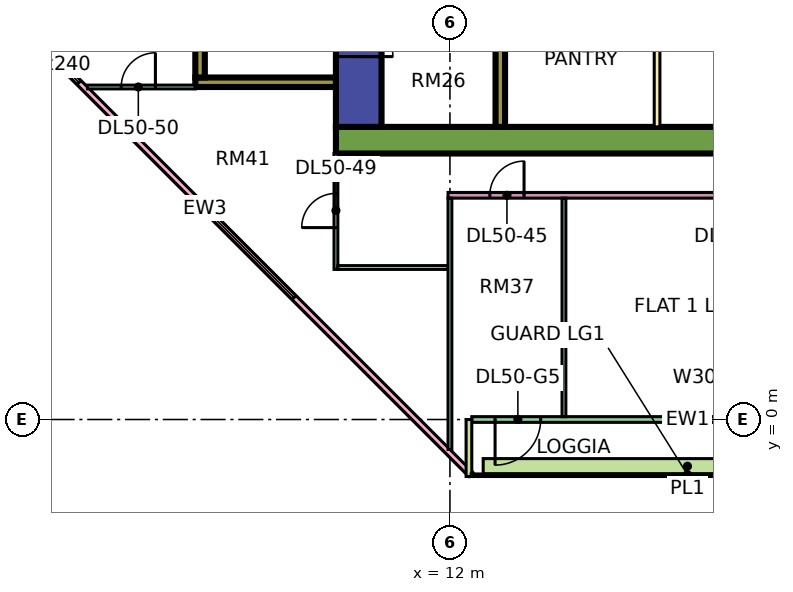
"""IFC4 building model, lengths in metres.
Left out: names, types, materials, properties, quantities, classifications, styles, units other than length and angle.
Written with IfcOpenShell. Run it as: python <this file> out.ifc"""

import sys

from ifc_helpers import new_model, si_unit, direction, frame, frame_2d, origin, place, context, subcontext, project, spatial, rectangle, extrude, element, fill, save


model = new_model("IFC4")
c1 = context("Model", 3, precision=1e-05, world=origin(), true_north=direction((0.0, 1.0)))
c2 = subcontext(c1, "Body", "Model", "MODEL_VIEW")
j1 = project(units=[si_unit("LENGTHUNIT", "METRE"), si_unit("PLANEANGLEUNIT", "RADIAN")], contexts=[c1])
p1 = place(None, origin())
s1 = spatial("IfcSite", under=j1, at=p1, CompositionType="ELEMENT")
p2 = place(p1, origin())
s2 = spatial("IfcBuilding", under=s1, at=p2, CompositionType="ELEMENT")
p3 = place(p2, frame((0.0, 0.0, 215.4)))
s3 = spatial("IfcBuildingStorey", under=s2, at=p3, CompositionType="ELEMENT", Elevation=215.4)
p4 = place(p3, frame((9.0, 7.35, 0.0), z_axis=(0.0, 0.0, 1.0), x_axis=(1.0, 0.0, 0.0)))
e1 = element("IfcWall", 1, at=p4, inside=s3, PredefinedType="SHEAR", context=c2, shape_type="SweptSolid", body=[
    extrude(rectangle(XDim=25.0, YDim=0.7, at=frame_2d((12.5, 0.0))), origin(), (0.0, 0.0, 1.0), 3.75),
])
p5 = place(p3, frame((9.6, 7.7, 0.0), z_axis=(0.0, 0.0, 1.0), x_axis=(0.0, 1.0, 0.0)))
e2 = element("IfcWall", 2, at=p5, inside=s3, PredefinedType="SHEAR", context=c2, shape_type="SweptSolid", body=[
    extrude(rectangle(XDim=11.6, YDim=1.2, at=frame_2d((5.8, 0.0))), origin(), (0.0, 0.0, 1.0), 3.75),
])
p6 = place(p5, frame((4.175, 0.0, 0.0)))
e3 = element("IfcOpeningElement", 3, at=p6, cuts=e2, PredefinedType="OPENING", context=c2, shape_type="SweptSolid", body=[
    extrude(rectangle(XDim=1.1, YDim=2.2, at=frame_2d((0.55, 1.1))), frame((0.0, 0.61, 0.0), z_axis=(0.0, -1.0, 0.0), x_axis=(1.0, 0.0, 0.0)), (0.0, 0.0, 1.0), 1.22),
])
p7 = place(p5, frame((6.675, 0.0, 0.0)))
e4 = element("IfcOpeningElement", 4, at=p7, cuts=e2, PredefinedType="OPENING", context=c2, shape_type="SweptSolid", body=[
    extrude(rectangle(XDim=1.1, YDim=2.2, at=frame_2d((0.55, 1.1))), frame((0.0, 0.61, 0.0), z_axis=(0.0, -1.0, 0.0), x_axis=(1.0, 0.0, 0.0)), (0.0, 0.0, 1.0), 1.22),
])
p8 = place(p5, frame((9.55, 0.0, 0.0)))
e5 = element("IfcOpeningElement", 5, at=p8, cuts=e2, PredefinedType="OPENING", context=c2, shape_type="SweptSolid", body=[
    extrude(rectangle(XDim=1.1, YDim=2.2, at=frame_2d((0.55, 1.1))), frame((0.0, 0.61, 0.0), z_axis=(0.0, -1.0, 0.0), x_axis=(1.0, 0.0, 0.0)), (0.0, 0.0, 1.0), 1.22),
])
p9 = place(p5, frame((1.85, 0.0, 0.0)))
e6 = element("IfcOpeningElement", 6, at=p9, cuts=e2, PredefinedType="OPENING", context=c2, shape_type="SweptSolid", body=[
    extrude(rectangle(XDim=0.9, YDim=2.1, at=frame_2d((0.45, 1.05))), frame((0.0, 0.61, 0.0), z_axis=(0.0, -1.0, 0.0), x_axis=(1.0, 0.0, 0.0)), (0.0, 0.0, 1.0), 1.22),
])
p10 = place(p3, frame((13.325, 7.7, 0.0), z_axis=(0.0, 0.0, 1.0), x_axis=(0.0, 1.0, 0.0)))
e7 = element("IfcWall", 7, at=p10, inside=s3, PredefinedType="SHEAR", context=c2, shape_type="SweptSolid", body=[
    extrude(rectangle(XDim=11.6, YDim=0.25, at=frame_2d((5.8, 0.0))), origin(), (0.0, 0.0, 1.0), 3.75),
])
p11 = place(p3, frame((5.3, 8.875, 0.0), z_axis=(0.0, 0.0, 1.0), x_axis=(1.0, 0.0, 0.0)))
e8 = element("IfcWall", 8, at=p11, inside=s3, PredefinedType="SHEAR", context=c2, shape_type="SweptSolid", body=[
    extrude(rectangle(XDim=3.7, YDim=0.25, at=frame_2d((1.85, 0.0))), origin(), (0.0, 0.0, 1.0), 3.75),
])
p12 = place(p3, frame((5.425, 9.0, 0.0), z_axis=(0.0, 0.0, 1.0), x_axis=(0.0, 1.0, 0.0)))
e9 = element("IfcWall", 9, at=p12, inside=s3, PredefinedType="SHEAR", context=c2, shape_type="SweptSolid", body=[
    extrude(rectangle(XDim=4.0, YDim=0.25, at=frame_2d((2.0, 0.0))), origin(), (0.0, 0.0, 1.0), 3.75),
])
p13 = place(p3, frame((-1.447, 12.553, 0.0), z_axis=(0.0, 0.0, 1.0), x_axis=(0.707106781187, -0.707106781187, 0.0)))
e10 = element("IfcWall", 10, at=p13, inside=s3, PredefinedType="SOLIDWALL", context=c2, shape_type="SweptSolid", body=[
    extrude(rectangle(XDim=19.799, YDim=0.15, at=frame_2d((9.899, 0.0))), origin(), (0.0, 0.0, 1.0), 3.35),
])
p14 = place(p13, frame((2.212, 0.0, 0.45)))
e11 = element("IfcOpeningElement", 11, at=p14, cuts=e10, PredefinedType="OPENING", context=c2, shape_type="SweptSolid", body=[
    extrude(rectangle(XDim=3.0, YDim=2.4, at=frame_2d((1.5, 1.2))), frame((0.0, 0.085, 0.0), z_axis=(0.0, -1.0, 0.0), x_axis=(1.0, 0.0, 0.0)), (0.0, 0.0, 1.0), 0.17),
])
p15 = place(p13, frame((10.216, 0.0, 0.45)))
e12 = element("IfcOpeningElement", 12, at=p15, cuts=e10, PredefinedType="OPENING", context=c2, shape_type="SweptSolid", body=[
    extrude(rectangle(XDim=3.0, YDim=2.4, at=frame_2d((1.5, 1.2))), frame((0.0, 0.085, 0.0), z_axis=(0.0, -1.0, 0.0), x_axis=(1.0, 0.0, 0.0)), (0.0, 0.0, 1.0), 0.17),
])
p16 = place(p3, frame((12.575, 0.0, 0.0), z_axis=(0.0, 0.0, 1.0), x_axis=(1.0, 0.0, 0.0)))
e13 = element("IfcWall", 13, at=p16, inside=s3, PredefinedType="SOLIDWALL", context=c2, shape_type="SweptSolid", body=[
    extrude(rectangle(XDim=11.35, YDim=0.15, at=frame_2d((5.675, 0.0))), origin(), (0.0, 0.0, 1.0), 3.35),
])
p17 = place(p16, frame((0.613, 0.0, 0.0)))
e14 = element("IfcOpeningElement", 14, at=p17, cuts=e13, PredefinedType="OPENING", context=c2, shape_type="SweptSolid", body=[
    extrude(rectangle(XDim=1.2, YDim=2.4, at=frame_2d((0.6, 1.2))), frame((0.0, 0.085, 0.0), z_axis=(0.0, -1.0, 0.0), x_axis=(1.0, 0.0, 0.0)), (0.0, 0.0, 1.0), 0.17),
])
p18 = place(p16, frame((5.163, 0.0, 0.45)))
e15 = element("IfcOpeningElement", 15, at=p18, cuts=e13, PredefinedType="OPENING", context=c2, shape_type="SweptSolid", body=[
    extrude(rectangle(XDim=3.0, YDim=2.4, at=frame_2d((1.5, 1.2))), frame((0.0, 0.085, 0.0), z_axis=(0.0, -1.0, 0.0), x_axis=(1.0, 0.0, 0.0)), (0.0, 0.0, 1.0), 0.17),
])
p19 = place(p3, frame((12.5, -1.5, 0.0), z_axis=(0.0, 0.0, 1.0), x_axis=(0.0, 1.0, 0.0)))
e16 = element("IfcWall", 16, at=p19, inside=s3, PredefinedType="SOLIDWALL", context=c2, shape_type="SweptSolid", body=[
    extrude(rectangle(XDim=1.5, YDim=0.15, at=frame_2d((0.75, 0.0))), origin(), (0.0, 0.0, 1.0), 3.35),
])
p20 = place(p3, frame((12.875, -1.229, 0.0), z_axis=(0.0, 0.0, 1.0), x_axis=(1.0, 0.0, 0.0)))
e17 = element("IfcWall", 17, at=p20, inside=s3, PredefinedType="SOLIDWALL", context=c2, shape_type="SweptSolid", body=[
    extrude(rectangle(XDim=10.75, YDim=0.4, at=frame_2d((5.375, 0.0))), origin(), (0.0, 0.0, 1.0), 0.7),
])
p21 = place(p3, frame((17.45, 7.7, 0.0), z_axis=(0.0, 0.0, 1.0), x_axis=(0.0, 1.0, 0.0)))
e18 = element("IfcWall", 18, at=p21, inside=s3, PredefinedType="PARTITIONING", context=c2, shape_type="SweptSolid", body=[
    extrude(rectangle(XDim=3.5, YDim=0.15, at=frame_2d((1.75, 0.0))), origin(), (0.0, 0.0, 1.0), 3.35),
])
p22 = place(p3, frame((2.461, 8.75, 0.0), z_axis=(0.0, 0.0, 1.0), x_axis=(1.0, 0.0, 0.0)))
e19 = element("IfcWall", 19, at=p22, inside=s3, PredefinedType="PARTITIONING", context=c2, shape_type="SweptSolid", body=[
    extrude(rectangle(XDim=2.839, YDim=0.1, at=frame_2d((1.419, 0.0))), origin(), (0.0, 0.0, 1.0), 3.35),
])
p23 = place(p22, frame((0.889, 0.0, 0.0)))
e20 = element("IfcOpeningElement", 20, at=p23, cuts=e19, PredefinedType="OPENING", context=c2, shape_type="SweptSolid", body=[
    extrude(rectangle(XDim=0.9, YDim=2.1, at=frame_2d((0.45, 1.05))), frame((0.0, 0.06, 0.0), z_axis=(0.0, -1.0, 0.0), x_axis=(1.0, 0.0, 0.0)), (0.0, 0.0, 1.0), 0.12),
])
p24 = place(p3, frame((9.0, 3.95, 0.0), z_axis=(0.0, 0.0, 1.0), x_axis=(0.0, 1.0, 0.0)))
e21 = element("IfcWall", 21, at=p24, inside=s3, PredefinedType="PARTITIONING", context=c2, shape_type="SweptSolid", body=[
    extrude(rectangle(XDim=3.05, YDim=0.1, at=frame_2d((1.525, 0.0))), origin(), (0.0, 0.0, 1.0), 3.35),
])
p25 = place(p24, frame((1.1, 0.0, 0.0)))
e22 = element("IfcOpeningElement", 22, at=p25, cuts=e21, PredefinedType="OPENING", context=c2, shape_type="SweptSolid", body=[
    extrude(rectangle(XDim=0.9, YDim=2.1, at=frame_2d((0.45, 1.05))), frame((0.0, 0.06, 0.0), z_axis=(0.0, -1.0, 0.0), x_axis=(1.0, 0.0, 0.0)), (0.0, 0.0, 1.0), 0.12),
])
p26 = place(p3, frame((9.05, 4.0, 0.0), z_axis=(0.0, 0.0, 1.0), x_axis=(1.0, 0.0, 0.0)))
e23 = element("IfcWall", 23, at=p26, inside=s3, PredefinedType="PARTITIONING", context=c2, shape_type="SweptSolid", body=[
    extrude(rectangle(XDim=2.9, YDim=0.1, at=frame_2d((1.45, 0.0))), origin(), (0.0, 0.0, 1.0), 3.35),
])
p27 = place(p3, frame((11.95, 5.9, 0.0), z_axis=(0.0, 0.0, 1.0), x_axis=(1.0, 0.0, 0.0)))
e24 = element("IfcWall", 24, at=p27, inside=s3, PredefinedType="PARTITIONING", context=c2, shape_type="SweptSolid", body=[
    extrude(rectangle(XDim=21.1, YDim=0.15, at=frame_2d((10.55, 0.0))), origin(), (0.0, 0.0, 1.0), 3.35),
])
p28 = place(p27, frame((1.1, 0.0, 0.0)))
e25 = element("IfcOpeningElement", 25, at=p28, cuts=e24, PredefinedType="OPENING", context=c2, shape_type="SweptSolid", body=[
    extrude(rectangle(XDim=0.9, YDim=2.1, at=frame_2d((0.45, 1.05))), frame((0.0, 0.085, 0.0), z_axis=(0.0, -1.0, 0.0), x_axis=(1.0, 0.0, 0.0)), (0.0, 0.0, 1.0), 0.17),
])
p29 = place(p27, frame((13.1, 0.0, 0.0)))
e26 = element("IfcOpeningElement", 26, at=p29, cuts=e24, PredefinedType="OPENING", context=c2, shape_type="SweptSolid", body=[
    extrude(rectangle(XDim=0.9, YDim=2.1, at=frame_2d((0.45, 1.05))), frame((0.0, 0.085, 0.0), z_axis=(0.0, -1.0, 0.0), x_axis=(1.0, 0.0, 0.0)), (0.0, 0.0, 1.0), 0.17),
])
p30 = place(p27, frame((7.1, 0.0, 0.0)))
e27 = element("IfcOpeningElement", 27, at=p30, cuts=e24, PredefinedType="OPENING", context=c2, shape_type="SweptSolid", body=[
    extrude(rectangle(XDim=0.9, YDim=2.1, at=frame_2d((0.45, 1.05))), frame((0.0, 0.085, 0.0), z_axis=(0.0, -1.0, 0.0), x_axis=(1.0, 0.0, 0.0)), (0.0, 0.0, 1.0), 0.17),
])
p31 = place(p3, frame((12.0, -0.788, 0.0), z_axis=(0.0, 0.0, 1.0), x_axis=(0.0, 1.0, 0.0)))
e28 = element("IfcWall", 28, at=p31, inside=s3, PredefinedType="PARTITIONING", context=c2, shape_type="SweptSolid", body=[
    extrude(rectangle(XDim=6.613, YDim=0.1, at=frame_2d((3.306, 0.0))), origin(), (0.0, 0.0, 1.0), 3.35),
])
p32 = place(p3, frame((15.0, 0.074, 0.0), z_axis=(0.0, 0.0, 1.0), x_axis=(0.0, 1.0, 0.0)))
e29 = element("IfcWall", 29, at=p32, inside=s3, PredefinedType="PARTITIONING", context=c2, shape_type="SweptSolid", body=[
    extrude(rectangle(XDim=5.751, YDim=0.1, at=frame_2d((2.875, 0.0))), origin(), (0.0, 0.0, 1.0), 3.35),
])
p33 = place(p14, origin())
e30 = element("IfcWindow", 30, at=p33, inside=s3, PartitioningType="SINGLE_PANEL", PredefinedType="WINDOW", context=c2, shape_type="SweptSolid", body=[
    extrude(rectangle(XDim=3.0, YDim=2.4, at=frame_2d((1.5, 1.2))), frame((0.0, 0.03, 0.0), z_axis=(0.0, -1.0, 0.0), x_axis=(1.0, 0.0, 0.0)), (0.0, 0.0, 1.0), 0.06),
])
fill(e11, e30)
p34 = place(p15, origin())
e31 = element("IfcWindow", 31, at=p34, inside=s3, PartitioningType="SINGLE_PANEL", PredefinedType="WINDOW", context=c2, shape_type="SweptSolid", body=[
    extrude(rectangle(XDim=3.0, YDim=2.4, at=frame_2d((1.5, 1.2))), frame((0.0, 0.03, 0.0), z_axis=(0.0, -1.0, 0.0), x_axis=(1.0, 0.0, 0.0)), (0.0, 0.0, 1.0), 0.06),
])
fill(e12, e31)
p35 = place(p17, frame((1.2, 0.0, 0.0), z_axis=(0.0, 0.0, 1.0), x_axis=(-1.0, 0.0, 0.0)))
e32 = element("IfcDoor", 32, at=p35, inside=s3, OperationType="DOUBLE_DOOR_SINGLE_SWING", PredefinedType="DOOR", context=c2, shape_type="SweptSolid", body=[
    extrude(rectangle(XDim=1.2, YDim=2.4, at=frame_2d((0.6, 1.2))), frame((0.0, 0.025, 0.0), z_axis=(0.0, -1.0, 0.0), x_axis=(1.0, 0.0, 0.0)), (0.0, 0.0, 1.0), 0.05),
])
fill(e14, e32)
p36 = place(p18, origin())
e33 = element("IfcWindow", 33, at=p36, inside=s3, PartitioningType="SINGLE_PANEL", PredefinedType="WINDOW", context=c2, shape_type="SweptSolid", body=[
    extrude(rectangle(XDim=3.0, YDim=2.4, at=frame_2d((1.5, 1.2))), frame((0.0, 0.03, 0.0), z_axis=(0.0, -1.0, 0.0), x_axis=(1.0, 0.0, 0.0)), (0.0, 0.0, 1.0), 0.06),
])
fill(e15, e33)
p37 = place(p9, frame((0.9, 0.0, 0.0), z_axis=(0.0, 0.0, 1.0), x_axis=(-1.0, 0.0, 0.0)))
e34 = element("IfcDoor", 34, at=p37, inside=s3, OperationType="SINGLE_SWING_LEFT", PredefinedType="DOOR", context=c2, shape_type="SweptSolid", body=[
    extrude(rectangle(XDim=0.9, YDim=2.1, at=frame_2d((0.45, 1.05))), frame((0.0, 0.025, 0.0), z_axis=(0.0, -1.0, 0.0), x_axis=(1.0, 0.0, 0.0)), (0.0, 0.0, 1.0), 0.05),
])
fill(e6, e34)
p38 = place(p28, frame((0.9, 0.0, 0.0), z_axis=(0.0, 0.0, 1.0), x_axis=(-1.0, 0.0, 0.0)))
e35 = element("IfcDoor", 35, at=p38, inside=s3, OperationType="SINGLE_SWING_RIGHT", PredefinedType="DOOR", context=c2, shape_type="SweptSolid", body=[
    extrude(rectangle(XDim=0.9, YDim=2.1, at=frame_2d((0.45, 1.05))), frame((0.0, 0.025, 0.0), z_axis=(0.0, -1.0, 0.0), x_axis=(1.0, 0.0, 0.0)), (0.0, 0.0, 1.0), 0.05),
])
fill(e25, e35)
p39 = place(p25, origin())
e36 = element("IfcDoor", 36, at=p39, inside=s3, OperationType="SINGLE_SWING_LEFT", PredefinedType="DOOR", context=c2, shape_type="SweptSolid", body=[
    extrude(rectangle(XDim=0.9, YDim=2.1, at=frame_2d((0.45, 1.05))), frame((0.0, 0.025, 0.0), z_axis=(0.0, -1.0, 0.0), x_axis=(1.0, 0.0, 0.0)), (0.0, 0.0, 1.0), 0.05),
])
fill(e22, e36)
p40 = place(p23, frame((0.9, 0.0, 0.0), z_axis=(0.0, 0.0, 1.0), x_axis=(-1.0, 0.0, 0.0)))
e37 = element("IfcDoor", 37, at=p40, inside=s3, OperationType="SINGLE_SWING_RIGHT", PredefinedType="DOOR", context=c2, shape_type="SweptSolid", body=[
    extrude(rectangle(XDim=0.9, YDim=2.1, at=frame_2d((0.45, 1.05))), frame((0.0, 0.025, 0.0), z_axis=(0.0, -1.0, 0.0), x_axis=(1.0, 0.0, 0.0)), (0.0, 0.0, 1.0), 0.05),
])
fill(e20, e37)
save(model, sys.argv[1])
